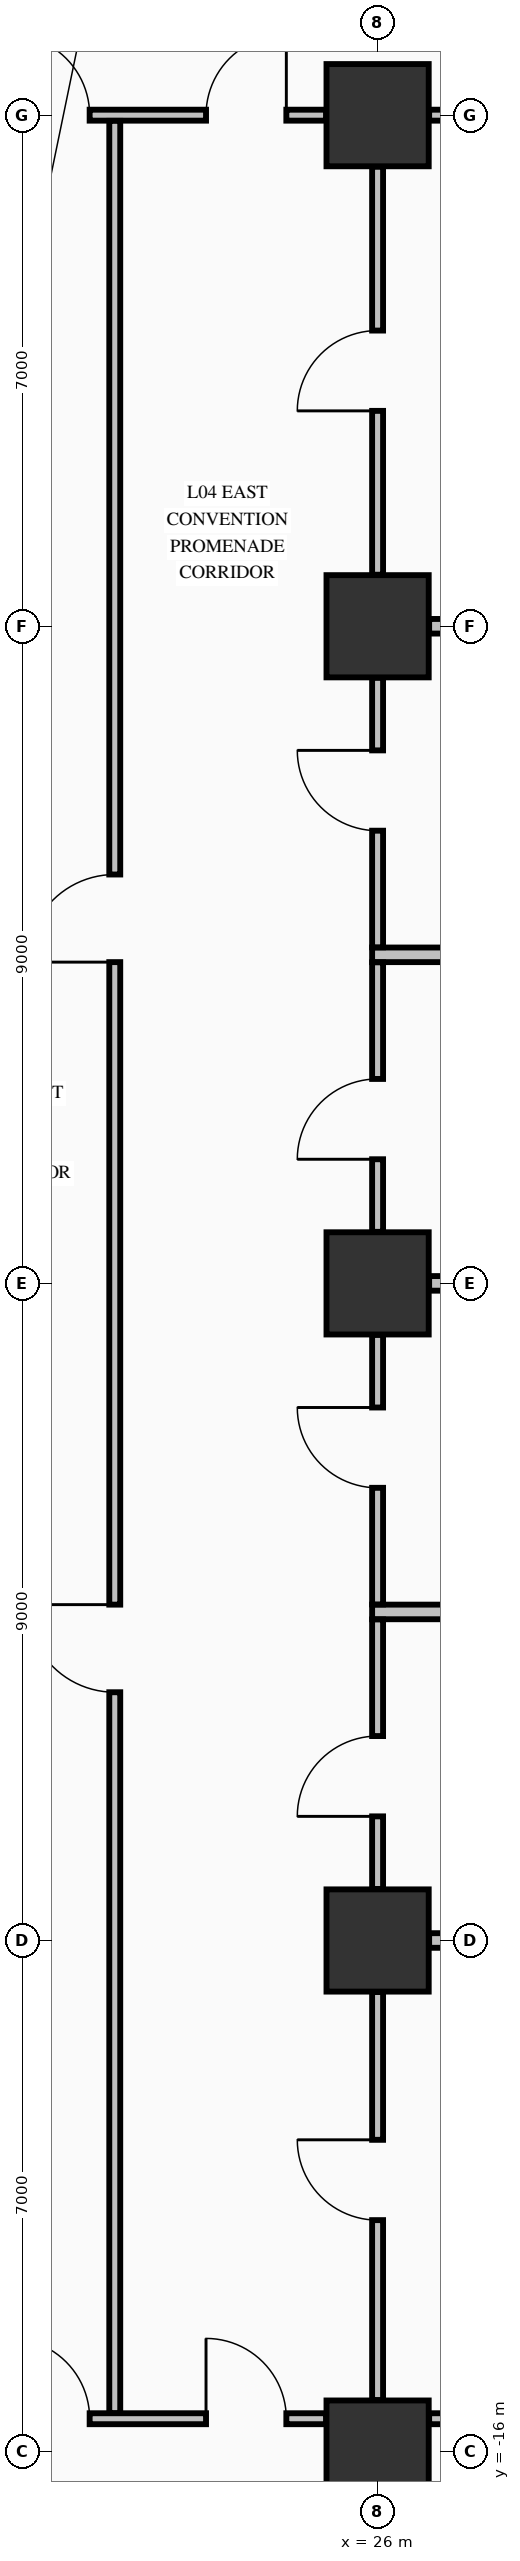
"""IFC4 building model, lengths in metres.
Left out: names, types, materials, properties, quantities, classifications, styles, units other than length and angle.
Written with IfcOpenShell. Run it as: python <this file> out.ifc"""

import sys

from ifc_helpers import new_model, si_unit, direction, frame, frame_2d, origin, origin_2d, place, context, subcontext, project, spatial, rectangle, extrude, element, fill, save


model = new_model("IFC4")
c1 = context("Model", 3, precision=1e-05, world=origin(), true_north=direction((0.0, 1.0)))
c2 = subcontext(c1, "Body", "Model", "MODEL_VIEW")
j1 = project(units=[si_unit("LENGTHUNIT", "METRE"), si_unit("PLANEANGLEUNIT", "RADIAN")], contexts=[c1])
p1 = place(None, origin())
s1 = spatial("IfcSite", under=j1, at=p1, CompositionType="ELEMENT")
p2 = place(p1, origin())
s2 = spatial("IfcBuilding", under=s1, at=p2, CompositionType="ELEMENT")
p3 = place(p2, frame((0.0, 0.0, 21.76)))
s3 = spatial("IfcBuildingStorey", under=s2, at=p3, CompositionType="ELEMENT", Elevation=21.76)
for number, where, z_axis, x_axis in (
    (1, (26.0, -16.0, -0.45), (0.0, 0.0, 1.0), (1.0, 0.0, 0.0)),
    (2, (26.0, -9.0, -0.45), (0.0, 0.0, 1.0), (1.0, 0.0, 0.0)),
    (3, (26.0, 0.0, -0.45), (0.0, 0.0, 1.0), (1.0, 0.0, 0.0)),
    (4, (26.0, 9.0, -0.45), (0.0, 0.0, 1.0), (1.0, 0.0, 0.0)),
    (5, (26.0, 16.0, -0.45), (0.0, 0.0, 1.0), (1.0, 0.0, 0.0)),
):
    element("IfcColumn", number, at=place(p3, frame(where, z_axis=z_axis, x_axis=x_axis)), inside=s3, PredefinedType="COLUMN", context=c2, shape_type="SweptSolid", body=[
        extrude(rectangle(XDim=1.4, YDim=1.4, at=origin_2d()), origin(), (0.0, 0.0, 1.0), 5.44),
    ])
p4 = place(p3, frame((20.806, -15.55, 0.0), z_axis=(0.0, 0.0, 1.0), x_axis=(1.0, 0.0, 0.0)))
e6 = element("IfcWall", 6, at=p4, inside=s3, PredefinedType="PARTITIONING", context=c2, shape_type="SweptSolid", body=[
    extrude(rectangle(XDim=4.488, YDim=0.15, at=frame_2d((2.244, 0.0))), origin(), (0.0, 0.0, 1.0), 3.332),
])
p5 = place(p4, frame((0.15, 0.0, 0.0)))
e7 = element("IfcOpeningElement", 7, at=p5, cuts=e6, PredefinedType="OPENING", context=c2, shape_type="SweptSolid", body=[
    extrude(rectangle(XDim=1.1, YDim=2.15, at=frame_2d((0.55, 1.075))), frame((0.0, 0.085, 0.0), z_axis=(0.0, -1.0, 0.0), x_axis=(1.0, 0.0, 0.0)), (0.0, 0.0, 1.0), 0.17),
])
p6 = place(p4, frame((2.844, 0.0, 0.0)))
e8 = element("IfcOpeningElement", 8, at=p6, cuts=e6, PredefinedType="OPENING", context=c2, shape_type="SweptSolid", body=[
    extrude(rectangle(XDim=1.1, YDim=2.15, at=frame_2d((0.55, 1.075))), frame((0.0, 0.085, 0.0), z_axis=(0.0, -1.0, 0.0), x_axis=(1.0, 0.0, 0.0)), (0.0, 0.0, 1.0), 0.17),
])
p7 = place(p3, frame((26.706, -15.55, 0.0), z_axis=(0.0, 0.0, 1.0), x_axis=(1.0, 0.0, 0.0)))
e9 = element("IfcWall", 9, at=p7, inside=s3, PredefinedType="PARTITIONING", context=c2, shape_type="SweptSolid", body=[
    extrude(rectangle(XDim=2.588, YDim=0.15, at=frame_2d((1.294, 0.0))), origin(), (0.0, 0.0, 1.0), 3.332),
])
p8 = place(p3, frame((26.706, -9.0, 0.0), z_axis=(0.0, 0.0, 1.0), x_axis=(1.0, 0.0, 0.0)))
e10 = element("IfcWall", 10, at=p8, inside=s3, PredefinedType="PARTITIONING", context=c2, shape_type="SweptSolid", body=[
    extrude(rectangle(XDim=2.588, YDim=0.2, at=frame_2d((1.294, 0.0))), origin(), (0.0, 0.0, 1.0), 3.332),
])
p9 = place(p3, frame((25.925, -4.5, 0.0), z_axis=(0.0, 0.0, 1.0), x_axis=(1.0, 0.0, 0.0)))
e11 = element("IfcWall", 11, at=p9, inside=s3, PredefinedType="PARTITIONING", context=c2, shape_type="SweptSolid", body=[
    extrude(rectangle(XDim=7.91, YDim=0.2, at=frame_2d((3.955, 0.0))), origin(), (0.0, 0.0, 1.0), 4.38),
])
p10 = place(p3, frame((26.706, 0.0, 0.0), z_axis=(0.0, 0.0, 1.0), x_axis=(1.0, 0.0, 0.0)))
e12 = element("IfcWall", 12, at=p10, inside=s3, PredefinedType="PARTITIONING", context=c2, shape_type="SweptSolid", body=[
    extrude(rectangle(XDim=2.588, YDim=0.2, at=frame_2d((1.294, 0.0))), origin(), (0.0, 0.0, 1.0), 3.332),
])
p11 = place(p3, frame((25.925, 4.5, 0.0), z_axis=(0.0, 0.0, 1.0), x_axis=(1.0, 0.0, 0.0)))
e13 = element("IfcWall", 13, at=p11, inside=s3, PredefinedType="PARTITIONING", context=c2, shape_type="SweptSolid", body=[
    extrude(rectangle(XDim=7.91, YDim=0.2, at=frame_2d((3.955, 0.0))), origin(), (0.0, 0.0, 1.0), 4.38),
])
p12 = place(p3, frame((26.706, 9.0, 0.0), z_axis=(0.0, 0.0, 1.0), x_axis=(1.0, 0.0, 0.0)))
e14 = element("IfcWall", 14, at=p12, inside=s3, PredefinedType="PARTITIONING", context=c2, shape_type="SweptSolid", body=[
    extrude(rectangle(XDim=2.588, YDim=0.2, at=frame_2d((1.294, 0.0))), origin(), (0.0, 0.0, 1.0), 3.332),
])
p13 = place(p3, frame((20.806, 16.0, 0.0), z_axis=(0.0, 0.0, 1.0), x_axis=(1.0, 0.0, 0.0)))
e15 = element("IfcWall", 15, at=p13, inside=s3, PredefinedType="PARTITIONING", context=c2, shape_type="SweptSolid", body=[
    extrude(rectangle(XDim=4.488, YDim=0.15, at=frame_2d((2.244, 0.0))), origin(), (0.0, 0.0, 1.0), 3.332),
])
p14 = place(p13, frame((0.15, 0.0, 0.0)))
e16 = element("IfcOpeningElement", 16, at=p14, cuts=e15, PredefinedType="OPENING", context=c2, shape_type="SweptSolid", body=[
    extrude(rectangle(XDim=1.1, YDim=2.15, at=frame_2d((0.55, 1.075))), frame((0.0, 0.085, 0.0), z_axis=(0.0, -1.0, 0.0), x_axis=(1.0, 0.0, 0.0)), (0.0, 0.0, 1.0), 0.17),
])
p15 = place(p13, frame((2.844, 0.0, 0.0)))
e17 = element("IfcOpeningElement", 17, at=p15, cuts=e15, PredefinedType="OPENING", context=c2, shape_type="SweptSolid", body=[
    extrude(rectangle(XDim=1.1, YDim=2.15, at=frame_2d((0.55, 1.075))), frame((0.0, 0.085, 0.0), z_axis=(0.0, -1.0, 0.0), x_axis=(1.0, 0.0, 0.0)), (0.0, 0.0, 1.0), 0.17),
])
p16 = place(p3, frame((26.706, 16.0, 0.0), z_axis=(0.0, 0.0, 1.0), x_axis=(1.0, 0.0, 0.0)))
e18 = element("IfcWall", 18, at=p16, inside=s3, PredefinedType="PARTITIONING", context=c2, shape_type="SweptSolid", body=[
    extrude(rectangle(XDim=2.588, YDim=0.15, at=frame_2d((1.294, 0.0))), origin(), (0.0, 0.0, 1.0), 3.332),
])
p17 = place(p3, frame((22.4, -15.472, 0.0), z_axis=(0.0, 0.0, 1.0), x_axis=(0.0, 1.0, 0.0)))
e19 = element("IfcWall", 19, at=p17, inside=s3, PredefinedType="PARTITIONING", context=c2, shape_type="SweptSolid", body=[
    extrude(rectangle(XDim=31.394, YDim=0.15, at=frame_2d((15.697, 0.0))), origin(), (0.0, 0.0, 1.0), 4.99),
])
p18 = place(p17, frame((9.872, 0.0, 0.0)))
e20 = element("IfcOpeningElement", 20, at=p18, cuts=e19, PredefinedType="OPENING", context=c2, shape_type="SweptSolid", body=[
    extrude(rectangle(XDim=1.2, YDim=2.15, at=frame_2d((0.6, 1.075))), frame((0.0, 0.085, 0.0), z_axis=(0.0, -1.0, 0.0), x_axis=(1.0, 0.0, 0.0)), (0.0, 0.0, 1.0), 0.17),
])
p19 = place(p17, frame((19.872, 0.0, 0.0)))
e21 = element("IfcOpeningElement", 21, at=p19, cuts=e19, PredefinedType="OPENING", context=c2, shape_type="SweptSolid", body=[
    extrude(rectangle(XDim=1.2, YDim=2.15, at=frame_2d((0.6, 1.075))), frame((0.0, 0.085, 0.0), z_axis=(0.0, -1.0, 0.0), x_axis=(1.0, 0.0, 0.0)), (0.0, 0.0, 1.0), 0.17),
])
p20 = place(p3, frame((26.0, -15.294, 0.0), z_axis=(0.0, 0.0, 1.0), x_axis=(0.0, 1.0, 0.0)))
e22 = element("IfcWall", 22, at=p20, inside=s3, PredefinedType="PARTITIONING", context=c2, shape_type="SweptSolid", body=[
    extrude(rectangle(XDim=5.588, YDim=0.15, at=frame_2d((2.794, 0.0))), origin(), (0.0, 0.0, 1.0), 3.332),
])
p21 = place(p20, frame((2.464, 0.0, 0.0)))
e23 = element("IfcOpeningElement", 23, at=p21, cuts=e22, PredefinedType="OPENING", context=c2, shape_type="SweptSolid", body=[
    extrude(rectangle(XDim=1.1, YDim=2.15, at=frame_2d((0.55, 1.075))), frame((0.0, 0.085, 0.0), z_axis=(0.0, -1.0, 0.0), x_axis=(1.0, 0.0, 0.0)), (0.0, 0.0, 1.0), 0.17),
])
p22 = place(p3, frame((26.0, -8.294, 0.0), z_axis=(0.0, 0.0, 1.0), x_axis=(0.0, 1.0, 0.0)))
e24 = element("IfcWall", 24, at=p22, inside=s3, PredefinedType="PARTITIONING", context=c2, shape_type="SweptSolid", body=[
    extrude(rectangle(XDim=3.691, YDim=0.15, at=frame_2d((1.845, 0.0))), origin(), (0.0, 0.0, 1.0), 3.332),
])
p23 = place(p22, frame((0.994, 0.0, 0.0)))
e25 = element("IfcOpeningElement", 25, at=p23, cuts=e24, PredefinedType="OPENING", context=c2, shape_type="SweptSolid", body=[
    extrude(rectangle(XDim=1.1, YDim=2.15, at=frame_2d((0.55, 1.075))), frame((0.0, 0.085, 0.0), z_axis=(0.0, -1.0, 0.0), x_axis=(1.0, 0.0, 0.0)), (0.0, 0.0, 1.0), 0.17),
])
p24 = place(p3, frame((26.0, -4.397, 0.0), z_axis=(0.0, 0.0, 1.0), x_axis=(0.0, 1.0, 0.0)))
e26 = element("IfcWall", 26, at=p24, inside=s3, PredefinedType="PARTITIONING", context=c2, shape_type="SweptSolid", body=[
    extrude(rectangle(XDim=3.691, YDim=0.15, at=frame_2d((1.845, 0.0))), origin(), (0.0, 0.0, 1.0), 3.332),
])
p25 = place(p24, frame((1.597, 0.0, 0.0)))
e27 = element("IfcOpeningElement", 27, at=p25, cuts=e26, PredefinedType="OPENING", context=c2, shape_type="SweptSolid", body=[
    extrude(rectangle(XDim=1.1, YDim=2.15, at=frame_2d((0.55, 1.075))), frame((0.0, 0.085, 0.0), z_axis=(0.0, -1.0, 0.0), x_axis=(1.0, 0.0, 0.0)), (0.0, 0.0, 1.0), 0.17),
])
p26 = place(p3, frame((26.0, 0.706, 0.0), z_axis=(0.0, 0.0, 1.0), x_axis=(0.0, 1.0, 0.0)))
e28 = element("IfcWall", 28, at=p26, inside=s3, PredefinedType="PARTITIONING", context=c2, shape_type="SweptSolid", body=[
    extrude(rectangle(XDim=3.691, YDim=0.15, at=frame_2d((1.845, 0.0))), origin(), (0.0, 0.0, 1.0), 3.332),
])
p27 = place(p26, frame((0.994, 0.0, 0.0)))
e29 = element("IfcOpeningElement", 29, at=p27, cuts=e28, PredefinedType="OPENING", context=c2, shape_type="SweptSolid", body=[
    extrude(rectangle(XDim=1.1, YDim=2.15, at=frame_2d((0.55, 1.075))), frame((0.0, 0.085, 0.0), z_axis=(0.0, -1.0, 0.0), x_axis=(1.0, 0.0, 0.0)), (0.0, 0.0, 1.0), 0.17),
])
p28 = place(p3, frame((26.0, 4.603, 0.0), z_axis=(0.0, 0.0, 1.0), x_axis=(0.0, 1.0, 0.0)))
e30 = element("IfcWall", 30, at=p28, inside=s3, PredefinedType="PARTITIONING", context=c2, shape_type="SweptSolid", body=[
    extrude(rectangle(XDim=3.691, YDim=0.15, at=frame_2d((1.845, 0.0))), origin(), (0.0, 0.0, 1.0), 3.332),
])
p29 = place(p28, frame((1.597, 0.0, 0.0)))
e31 = element("IfcOpeningElement", 31, at=p29, cuts=e30, PredefinedType="OPENING", context=c2, shape_type="SweptSolid", body=[
    extrude(rectangle(XDim=1.1, YDim=2.15, at=frame_2d((0.55, 1.075))), frame((0.0, 0.085, 0.0), z_axis=(0.0, -1.0, 0.0), x_axis=(1.0, 0.0, 0.0)), (0.0, 0.0, 1.0), 0.17),
])
p30 = place(p3, frame((26.0, 9.706, 0.0), z_axis=(0.0, 0.0, 1.0), x_axis=(0.0, 1.0, 0.0)))
e32 = element("IfcWall", 32, at=p30, inside=s3, PredefinedType="PARTITIONING", context=c2, shape_type="SweptSolid", body=[
    extrude(rectangle(XDim=5.588, YDim=0.15, at=frame_2d((2.794, 0.0))), origin(), (0.0, 0.0, 1.0), 3.332),
])
p31 = place(p30, frame((2.244, 0.0, 0.0)))
e33 = element("IfcOpeningElement", 33, at=p31, cuts=e32, PredefinedType="OPENING", context=c2, shape_type="SweptSolid", body=[
    extrude(rectangle(XDim=1.1, YDim=2.15, at=frame_2d((0.55, 1.075))), frame((0.0, 0.085, 0.0), z_axis=(0.0, -1.0, 0.0), x_axis=(1.0, 0.0, 0.0)), (0.0, 0.0, 1.0), 0.17),
])
p32 = place(p14, origin())
e34 = element("IfcDoor", 34, at=p32, inside=s3, OperationType="SINGLE_SWING_LEFT", PredefinedType="DOOR", context=c2, shape_type="SweptSolid", body=[
    extrude(rectangle(XDim=1.1, YDim=2.15, at=frame_2d((0.55, 1.075))), frame((0.0, 0.025, 0.0), z_axis=(0.0, -1.0, 0.0), x_axis=(1.0, 0.0, 0.0)), (0.0, 0.0, 1.0), 0.05),
])
fill(e16, e34)
p33 = place(p5, origin())
e35 = element("IfcDoor", 35, at=p33, inside=s3, OperationType="SINGLE_SWING_LEFT", PredefinedType="DOOR", context=c2, shape_type="SweptSolid", body=[
    extrude(rectangle(XDim=1.1, YDim=2.15, at=frame_2d((0.55, 1.075))), frame((0.0, 0.025, 0.0), z_axis=(0.0, -1.0, 0.0), x_axis=(1.0, 0.0, 0.0)), (0.0, 0.0, 1.0), 0.05),
])
fill(e7, e35)
p34 = place(p18, origin())
e36 = element("IfcDoor", 36, at=p34, inside=s3, OperationType="SINGLE_SWING_RIGHT", PredefinedType="DOOR", context=c2, shape_type="SweptSolid", body=[
    extrude(rectangle(XDim=1.2, YDim=2.15, at=frame_2d((0.6, 1.075))), frame((0.0, 0.025, 0.0), z_axis=(0.0, -1.0, 0.0), x_axis=(1.0, 0.0, 0.0)), (0.0, 0.0, 1.0), 0.05),
])
fill(e20, e36)
p35 = place(p19, origin())
e37 = element("IfcDoor", 37, at=p35, inside=s3, OperationType="SINGLE_SWING_LEFT", PredefinedType="DOOR", context=c2, shape_type="SweptSolid", body=[
    extrude(rectangle(XDim=1.2, YDim=2.15, at=frame_2d((0.6, 1.075))), frame((0.0, 0.025, 0.0), z_axis=(0.0, -1.0, 0.0), x_axis=(1.0, 0.0, 0.0)), (0.0, 0.0, 1.0), 0.05),
])
fill(e21, e37)
p36 = place(p15, origin())
e38 = element("IfcDoor", 38, at=p36, inside=s3, OperationType="SINGLE_SWING_RIGHT", PredefinedType="DOOR", context=c2, shape_type="SweptSolid", body=[
    extrude(rectangle(XDim=1.1, YDim=2.15, at=frame_2d((0.55, 1.075))), frame((0.0, 0.025, 0.0), z_axis=(0.0, -1.0, 0.0), x_axis=(1.0, 0.0, 0.0)), (0.0, 0.0, 1.0), 0.05),
])
fill(e17, e38)
p37 = place(p6, origin())
e39 = element("IfcDoor", 39, at=p37, inside=s3, OperationType="SINGLE_SWING_LEFT", PredefinedType="DOOR", context=c2, shape_type="SweptSolid", body=[
    extrude(rectangle(XDim=1.1, YDim=2.15, at=frame_2d((0.55, 1.075))), frame((0.0, 0.025, 0.0), z_axis=(0.0, -1.0, 0.0), x_axis=(1.0, 0.0, 0.0)), (0.0, 0.0, 1.0), 0.05),
])
fill(e8, e39)
p38 = place(p21, origin())
e40 = element("IfcDoor", 40, at=p38, inside=s3, OperationType="SINGLE_SWING_RIGHT", PredefinedType="DOOR", context=c2, shape_type="SweptSolid", body=[
    extrude(rectangle(XDim=1.1, YDim=2.15, at=frame_2d((0.55, 1.075))), frame((0.0, 0.025, 0.0), z_axis=(0.0, -1.0, 0.0), x_axis=(1.0, 0.0, 0.0)), (0.0, 0.0, 1.0), 0.05),
])
fill(e23, e40)
p39 = place(p23, origin())
e41 = element("IfcDoor", 41, at=p39, inside=s3, OperationType="SINGLE_SWING_LEFT", PredefinedType="DOOR", context=c2, shape_type="SweptSolid", body=[
    extrude(rectangle(XDim=1.1, YDim=2.15, at=frame_2d((0.55, 1.075))), frame((0.0, 0.025, 0.0), z_axis=(0.0, -1.0, 0.0), x_axis=(1.0, 0.0, 0.0)), (0.0, 0.0, 1.0), 0.05),
])
fill(e25, e41)
p40 = place(p25, origin())
e42 = element("IfcDoor", 42, at=p40, inside=s3, OperationType="SINGLE_SWING_RIGHT", PredefinedType="DOOR", context=c2, shape_type="SweptSolid", body=[
    extrude(rectangle(XDim=1.1, YDim=2.15, at=frame_2d((0.55, 1.075))), frame((0.0, 0.025, 0.0), z_axis=(0.0, -1.0, 0.0), x_axis=(1.0, 0.0, 0.0)), (0.0, 0.0, 1.0), 0.05),
])
fill(e27, e42)
p41 = place(p27, origin())
e43 = element("IfcDoor", 43, at=p41, inside=s3, OperationType="SINGLE_SWING_LEFT", PredefinedType="DOOR", context=c2, shape_type="SweptSolid", body=[
    extrude(rectangle(XDim=1.1, YDim=2.15, at=frame_2d((0.55, 1.075))), frame((0.0, 0.025, 0.0), z_axis=(0.0, -1.0, 0.0), x_axis=(1.0, 0.0, 0.0)), (0.0, 0.0, 1.0), 0.05),
])
fill(e29, e43)
p42 = place(p29, origin())
e44 = element("IfcDoor", 44, at=p42, inside=s3, OperationType="SINGLE_SWING_RIGHT", PredefinedType="DOOR", context=c2, shape_type="SweptSolid", body=[
    extrude(rectangle(XDim=1.1, YDim=2.15, at=frame_2d((0.55, 1.075))), frame((0.0, 0.025, 0.0), z_axis=(0.0, -1.0, 0.0), x_axis=(1.0, 0.0, 0.0)), (0.0, 0.0, 1.0), 0.05),
])
fill(e31, e44)
p43 = place(p31, origin())
e45 = element("IfcDoor", 45, at=p43, inside=s3, OperationType="SINGLE_SWING_LEFT", PredefinedType="DOOR", context=c2, shape_type="SweptSolid", body=[
    extrude(rectangle(XDim=1.1, YDim=2.15, at=frame_2d((0.55, 1.075))), frame((0.0, 0.025, 0.0), z_axis=(0.0, -1.0, 0.0), x_axis=(1.0, 0.0, 0.0)), (0.0, 0.0, 1.0), 0.05),
])
fill(e33, e45)
save(model, sys.argv[1])
